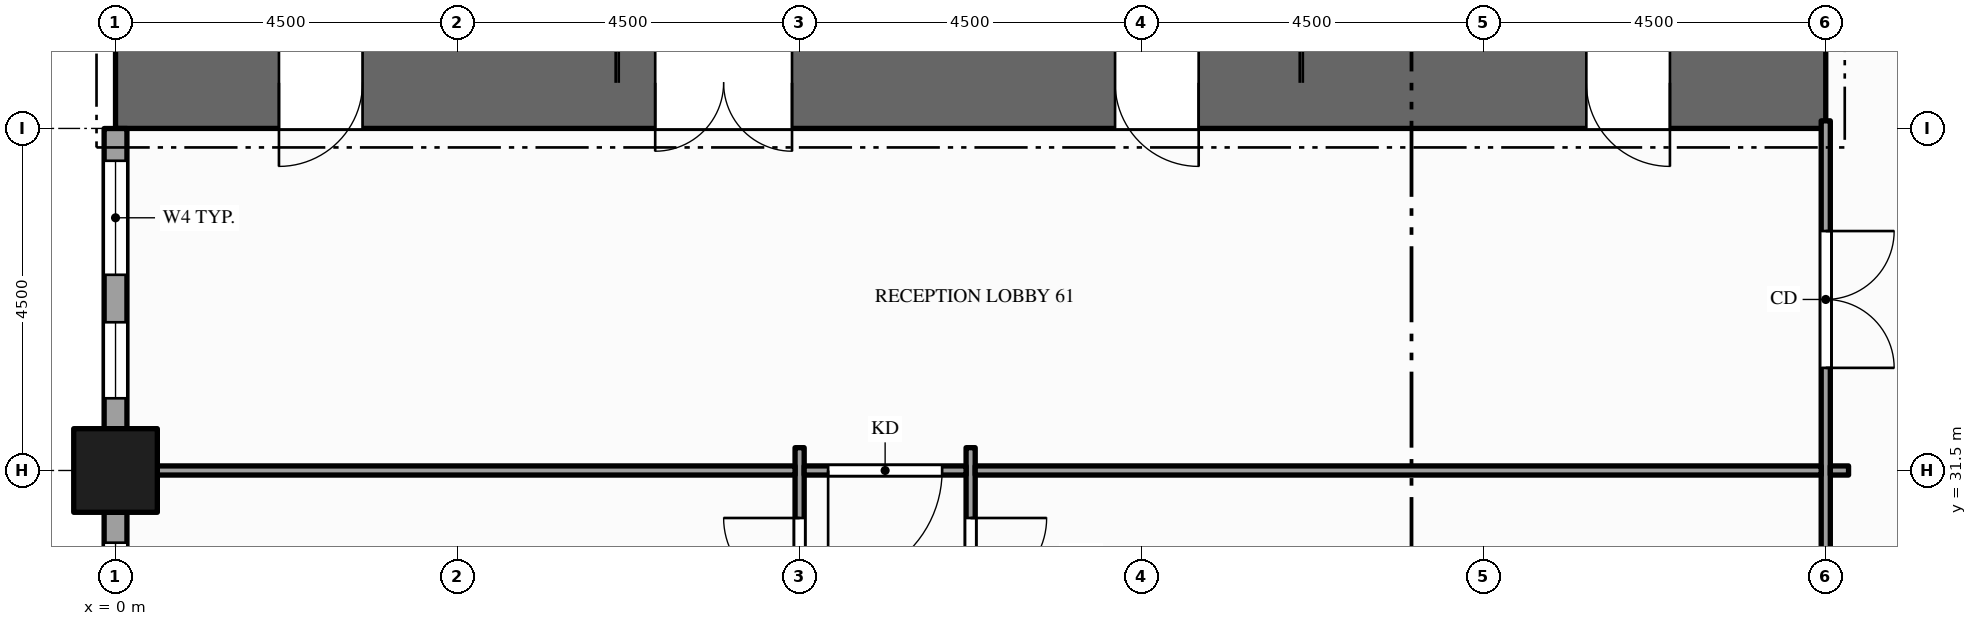
"""IFC4 building model, lengths in metres.
Left out: names, types, materials, properties, quantities, classifications, styles, units other than length and angle.
Written with IfcOpenShell. Run it as: python <this file> out.ifc"""

import sys

from ifc_helpers import new_model, si_unit, direction, frame, frame_2d, origin, origin_2d, place, context, subcontext, project, spatial, rectangle, hollow_rectangle, extrude, element, fill, save


model = new_model("IFC4")
c1 = context("Model", 3, precision=1e-05, world=origin(), true_north=direction((0.0, 1.0)))
c2 = subcontext(c1, "Body", "Model", "MODEL_VIEW")
j1 = project(units=[si_unit("LENGTHUNIT", "METRE"), si_unit("PLANEANGLEUNIT", "RADIAN")], contexts=[c1])
p1 = place(None, origin())
s1 = spatial("IfcSite", under=j1, at=p1, CompositionType="ELEMENT")
p2 = place(p1, origin())
s2 = spatial("IfcBuilding", under=s1, at=p2, CompositionType="ELEMENT")
p3 = place(p2, frame((0.0, 0.0, 14.0)))
s3 = spatial("IfcBuildingStorey", under=s2, at=p3, CompositionType="ELEMENT", Elevation=14.0)
p4 = place(p3, frame((0.0, 36.6, -0.15), z_axis=(0.0, 0.0, 1.0), x_axis=(1.0, 0.0, 0.0)))
e1 = element("IfcWall", 1, at=p4, inside=s3, PredefinedType="SHEAR", context=c2, shape_type="SweptSolid", body=[
    extrude(rectangle(XDim=22.5, YDim=1.2, at=frame_2d((11.25, 0.0))), origin(), (0.0, 0.0, 1.0), 5.0),
])
p5 = place(p4, frame((7.1, 0.0, 0.15)))
e2 = element("IfcOpeningElement", 2, at=p5, cuts=e1, PredefinedType="OPENING", context=c2, shape_type="SweptSolid", body=[
    extrude(rectangle(XDim=1.8, YDim=2.1, at=frame_2d((0.9, 1.05))), frame((0.0, 0.61, 0.0), z_axis=(0.0, -1.0, 0.0), x_axis=(1.0, 0.0, 0.0)), (0.0, 0.0, 1.0), 1.22),
])
p6 = place(p4, frame((13.15, 0.0, 0.15)))
e3 = element("IfcOpeningElement", 3, at=p6, cuts=e1, PredefinedType="OPENING", context=c2, shape_type="SweptSolid", body=[
    extrude(rectangle(XDim=1.1, YDim=2.1, at=frame_2d((0.55, 1.05))), frame((0.0, 0.61, 0.0), z_axis=(0.0, -1.0, 0.0), x_axis=(1.0, 0.0, 0.0)), (0.0, 0.0, 1.0), 1.22),
])
p7 = place(p4, frame((2.15, 0.0, 0.15)))
e4 = element("IfcOpeningElement", 4, at=p7, cuts=e1, PredefinedType="OPENING", context=c2, shape_type="SweptSolid", body=[
    extrude(rectangle(XDim=1.1, YDim=2.1, at=frame_2d((0.55, 1.05))), frame((0.0, 0.61, 0.0), z_axis=(0.0, -1.0, 0.0), x_axis=(1.0, 0.0, 0.0)), (0.0, 0.0, 1.0), 1.22),
])
p8 = place(p4, frame((19.35, 0.0, 0.15)))
e5 = element("IfcOpeningElement", 5, at=p8, cuts=e1, PredefinedType="OPENING", context=c2, shape_type="SweptSolid", body=[
    extrude(rectangle(XDim=1.1, YDim=2.1, at=frame_2d((0.55, 1.05))), frame((0.0, 0.61, 0.0), z_axis=(0.0, -1.0, 0.0), x_axis=(1.0, 0.0, 0.0)), (0.0, 0.0, 1.0), 1.22),
])
p9 = place(p3, frame((0.0, 31.5, -0.25), z_axis=(0.0, 0.0, 1.0), x_axis=(1.0, 0.0, 0.0)))
e6 = element("IfcColumn", 6, at=p9, inside=s3, PredefinedType="COLUMN", context=c2, shape_type="SweptSolid", body=[
    extrude(hollow_rectangle(XDim=1.1, YDim=1.1, WallThickness=0.06, at=origin_2d()), origin(), (0.0, 0.0, 1.0), 5.0),
])
p10 = place(p3, frame((0.0, 35.999, 0.0), z_axis=(0.0, 0.0, 1.0), x_axis=(0.0, -1.0, 0.0)))
e7 = element("IfcWall", 7, at=p10, inside=s3, PredefinedType="STANDARD", context=c2, shape_type="SweptSolid", body=[
    extrude(rectangle(XDim=3.949, YDim=0.3, at=frame_2d((1.975, 0.0))), origin(), (0.0, 0.0, 1.0), 4.036),
])
p11 = place(p10, frame((0.425, 0.0, 0.9)))
e8 = element("IfcOpeningElement", 8, at=p11, cuts=e7, PredefinedType="OPENING", context=c2, shape_type="SweptSolid", body=[
    extrude(rectangle(XDim=1.5, YDim=2.75, at=frame_2d((0.75, 1.375))), frame((0.0, 0.16, 0.0), z_axis=(0.0, -1.0, 0.0), x_axis=(1.0, 0.0, 0.0)), (0.0, 0.0, 1.0), 0.32),
])
p12 = place(p10, frame((2.549, 0.0, 0.9)))
e9 = element("IfcOpeningElement", 9, at=p12, cuts=e7, PredefinedType="OPENING", context=c2, shape_type="SweptSolid", body=[
    extrude(rectangle(XDim=1.0, YDim=2.75, at=frame_2d((0.5, 1.375))), frame((0.0, 0.16, 0.0), z_axis=(0.0, -1.0, 0.0), x_axis=(1.0, 0.0, 0.0)), (0.0, 0.0, 1.0), 0.32),
])
p13 = place(p3, frame((0.0, 30.95, 0.0), z_axis=(0.0, 0.0, 1.0), x_axis=(0.0, -1.0, 0.0)))
e10 = element("IfcWall", 10, at=p13, inside=s3, PredefinedType="STANDARD", context=c2, shape_type="SweptSolid", body=[
    extrude(rectangle(XDim=3.4, YDim=0.3, at=frame_2d((1.7, 0.0))), origin(), (0.0, 0.0, 1.0), 4.036),
])
p14 = place(p13, frame((0.4, 0.0, 0.9)))
e11 = element("IfcOpeningElement", 11, at=p14, cuts=e10, PredefinedType="OPENING", context=c2, shape_type="SweptSolid", body=[
    extrude(rectangle(XDim=1.0, YDim=2.75, at=frame_2d((0.5, 1.375))), frame((0.0, 0.16, 0.0), z_axis=(0.0, -1.0, 0.0), x_axis=(1.0, 0.0, 0.0)), (0.0, 0.0, 1.0), 0.32),
])
p15 = place(p13, frame((2.0, 0.0, 0.9)))
e12 = element("IfcOpeningElement", 12, at=p15, cuts=e10, PredefinedType="OPENING", context=c2, shape_type="SweptSolid", body=[
    extrude(rectangle(XDim=1.0, YDim=2.75, at=frame_2d((0.5, 1.375))), frame((0.0, 0.16, 0.0), z_axis=(0.0, -1.0, 0.0), x_axis=(1.0, 0.0, 0.0)), (0.0, 0.0, 1.0), 0.32),
])
p16 = place(p3, frame((9.0, 10.95, 0.0), z_axis=(0.0, 0.0, 1.0), x_axis=(0.0, 1.0, 0.0)))
e13 = element("IfcWall", 13, at=p16, inside=s3, PredefinedType="PARTITIONING", context=c2, shape_type="SweptSolid", body=[
    extrude(rectangle(XDim=20.85, YDim=0.12, at=frame_2d((10.425, 0.0))), origin(), (0.0, 0.0, 1.0), 3.5),
])
p17 = place(p16, frame((12.175, 0.0, 0.0)))
e14 = element("IfcOpeningElement", 14, at=p17, cuts=e13, PredefinedType="OPENING", context=c2, shape_type="SweptSolid", body=[
    extrude(rectangle(XDim=1.0, YDim=2.1, at=frame_2d((0.5, 1.05))), frame((0.0, 0.07, 0.0), z_axis=(0.0, -1.0, 0.0), x_axis=(1.0, 0.0, 0.0)), (0.0, 0.0, 1.0), 0.14),
])
p18 = place(p16, frame((14.425, 0.0, 0.0)))
e15 = element("IfcOpeningElement", 15, at=p18, cuts=e13, PredefinedType="OPENING", context=c2, shape_type="SweptSolid", body=[
    extrude(rectangle(XDim=1.0, YDim=2.1, at=frame_2d((0.5, 1.05))), frame((0.0, 0.07, 0.0), z_axis=(0.0, -1.0, 0.0), x_axis=(1.0, 0.0, 0.0)), (0.0, 0.0, 1.0), 0.14),
])
p19 = place(p16, frame((16.675, 0.0, 0.0)))
e16 = element("IfcOpeningElement", 16, at=p19, cuts=e13, PredefinedType="OPENING", context=c2, shape_type="SweptSolid", body=[
    extrude(rectangle(XDim=1.0, YDim=2.1, at=frame_2d((0.5, 1.05))), frame((0.0, 0.07, 0.0), z_axis=(0.0, -1.0, 0.0), x_axis=(1.0, 0.0, 0.0)), (0.0, 0.0, 1.0), 0.14),
])
p20 = place(p16, frame((18.925, 0.0, 0.0)))
e17 = element("IfcOpeningElement", 17, at=p20, cuts=e13, PredefinedType="OPENING", context=c2, shape_type="SweptSolid", body=[
    extrude(rectangle(XDim=1.0, YDim=2.1, at=frame_2d((0.5, 1.05))), frame((0.0, 0.07, 0.0), z_axis=(0.0, -1.0, 0.0), x_axis=(1.0, 0.0, 0.0)), (0.0, 0.0, 1.0), 0.14),
])
p21 = place(p3, frame((11.25, 10.95, 0.0), z_axis=(0.0, 0.0, 1.0), x_axis=(0.0, 1.0, 0.0)))
e18 = element("IfcWall", 18, at=p21, inside=s3, PredefinedType="PARTITIONING", context=c2, shape_type="SweptSolid", body=[
    extrude(rectangle(XDim=20.85, YDim=0.12, at=frame_2d((10.425, 0.0))), origin(), (0.0, 0.0, 1.0), 3.5),
])
p22 = place(p21, frame((5.425, 0.0, 0.0)))
e19 = element("IfcOpeningElement", 19, at=p22, cuts=e18, PredefinedType="OPENING", context=c2, shape_type="SweptSolid", body=[
    extrude(rectangle(XDim=1.0, YDim=2.1, at=frame_2d((0.5, 1.05))), frame((0.0, 0.07, 0.0), z_axis=(0.0, -1.0, 0.0), x_axis=(1.0, 0.0, 0.0)), (0.0, 0.0, 1.0), 0.14),
])
p23 = place(p21, frame((14.425, 0.0, 0.0)))
e20 = element("IfcOpeningElement", 20, at=p23, cuts=e18, PredefinedType="OPENING", context=c2, shape_type="SweptSolid", body=[
    extrude(rectangle(XDim=1.0, YDim=2.1, at=frame_2d((0.5, 1.05))), frame((0.0, 0.07, 0.0), z_axis=(0.0, -1.0, 0.0), x_axis=(1.0, 0.0, 0.0)), (0.0, 0.0, 1.0), 0.14),
])
p24 = place(p21, frame((18.925, 0.0, 0.0)))
e21 = element("IfcOpeningElement", 21, at=p24, cuts=e18, PredefinedType="OPENING", context=c2, shape_type="SweptSolid", body=[
    extrude(rectangle(XDim=1.0, YDim=2.1, at=frame_2d((0.5, 1.05))), frame((0.0, 0.07, 0.0), z_axis=(0.0, -1.0, 0.0), x_axis=(1.0, 0.0, 0.0)), (0.0, 0.0, 1.0), 0.14),
])
p25 = place(p3, frame((22.5, 0.15, 0.0), z_axis=(0.0, 0.0, 1.0), x_axis=(0.0, 1.0, 0.0)))
e22 = element("IfcWall", 22, at=p25, inside=s3, PredefinedType="PARTITIONING", context=c2, shape_type="SweptSolid", body=[
    extrude(rectangle(XDim=35.95, YDim=0.12, at=frame_2d((17.975, 0.0))), origin(), (0.0, 0.0, 1.0), 3.759),
])
p26 = place(p25, frame((9.225, 0.0, 0.0)))
e23 = element("IfcOpeningElement", 23, at=p26, cuts=e22, PredefinedType="OPENING", context=c2, shape_type="SweptSolid", body=[
    extrude(rectangle(XDim=1.5, YDim=2.1, at=frame_2d((0.75, 1.05))), frame((0.0, 0.07, 0.0), z_axis=(0.0, -1.0, 0.0), x_axis=(1.0, 0.0, 0.0)), (0.0, 0.0, 1.0), 0.14),
])
p27 = place(p25, frame((32.7, 0.0, 0.0)))
e24 = element("IfcOpeningElement", 24, at=p27, cuts=e22, PredefinedType="OPENING", context=c2, shape_type="SweptSolid", body=[
    extrude(rectangle(XDim=1.8, YDim=2.1, at=frame_2d((0.9, 1.05))), frame((0.0, 0.07, 0.0), z_axis=(0.0, -1.0, 0.0), x_axis=(1.0, 0.0, 0.0)), (0.0, 0.0, 1.0), 0.14),
])
p28 = place(p3, frame((0.15, 31.5, 0.0), z_axis=(0.0, 0.0, 1.0), x_axis=(1.0, 0.0, 0.0)))
e25 = element("IfcWall", 25, at=p28, inside=s3, PredefinedType="PARTITIONING", context=c2, shape_type="SweptSolid", body=[
    extrude(rectangle(XDim=8.79, YDim=0.12, at=frame_2d((4.395, 0.0))), origin(), (0.0, 0.0, 1.0), 3.759),
])
p29 = place(p3, frame((9.06, 31.5, 0.0), z_axis=(0.0, 0.0, 1.0), x_axis=(1.0, 0.0, 0.0)))
e26 = element("IfcWall", 26, at=p29, inside=s3, PredefinedType="PARTITIONING", context=c2, shape_type="SweptSolid", body=[
    extrude(rectangle(XDim=2.13, YDim=0.12, at=frame_2d((1.065, 0.0))), origin(), (0.0, 0.0, 1.0), 3.759),
])
p30 = place(p29, frame((0.315, 0.0, 0.0)))
e27 = element("IfcOpeningElement", 27, at=p30, cuts=e26, PredefinedType="OPENING", context=c2, shape_type="SweptSolid", body=[
    extrude(rectangle(XDim=1.5, YDim=2.1, at=frame_2d((0.75, 1.05))), frame((0.0, 0.07, 0.0), z_axis=(0.0, -1.0, 0.0), x_axis=(1.0, 0.0, 0.0)), (0.0, 0.0, 1.0), 0.14),
])
p31 = place(p3, frame((11.31, 31.5, 0.0), z_axis=(0.0, 0.0, 1.0), x_axis=(1.0, 0.0, 0.0)))
e28 = element("IfcWall", 28, at=p31, inside=s3, PredefinedType="PARTITIONING", context=c2, shape_type="SweptSolid", body=[
    extrude(rectangle(XDim=11.13, YDim=0.12, at=frame_2d((5.565, 0.0))), origin(), (0.0, 0.0, 1.0), 3.5),
])
p32 = place(p3, frame((22.56, 31.5, 0.0), z_axis=(0.0, 0.0, 1.0), x_axis=(1.0, 0.0, 0.0)))
e29 = element("IfcWall", 29, at=p32, inside=s3, PredefinedType="PARTITIONING", context=c2, shape_type="SweptSolid", body=[
    extrude(rectangle(XDim=0.24, YDim=0.12, at=frame_2d((0.12, 0.0))), origin(), (0.0, 0.0, 1.0), 3.759),
])
p33 = place(p11, origin())
e30 = element("IfcWindow", 30, at=p33, inside=s3, PartitioningType="SINGLE_PANEL", PredefinedType="WINDOW", context=c2, shape_type="SweptSolid", body=[
    extrude(rectangle(XDim=1.5, YDim=2.75, at=frame_2d((0.75, 1.375))), frame((0.0, 0.03, 0.0), z_axis=(0.0, -1.0, 0.0), x_axis=(1.0, 0.0, 0.0)), (0.0, 0.0, 1.0), 0.06),
])
fill(e8, e30)
p34 = place(p12, origin())
e31 = element("IfcWindow", 31, at=p34, inside=s3, PartitioningType="SINGLE_PANEL", PredefinedType="WINDOW", context=c2, shape_type="SweptSolid", body=[
    extrude(rectangle(XDim=1.0, YDim=2.75, at=frame_2d((0.5, 1.375))), frame((0.0, 0.03, 0.0), z_axis=(0.0, -1.0, 0.0), x_axis=(1.0, 0.0, 0.0)), (0.0, 0.0, 1.0), 0.06),
])
fill(e9, e31)
p35 = place(p14, origin())
e32 = element("IfcWindow", 32, at=p35, inside=s3, PartitioningType="SINGLE_PANEL", PredefinedType="WINDOW", context=c2, shape_type="SweptSolid", body=[
    extrude(rectangle(XDim=1.0, YDim=2.75, at=frame_2d((0.5, 1.375))), frame((0.0, 0.03, 0.0), z_axis=(0.0, -1.0, 0.0), x_axis=(1.0, 0.0, 0.0)), (0.0, 0.0, 1.0), 0.06),
])
fill(e11, e32)
p36 = place(p5, origin())
e33 = element("IfcDoor", 33, at=p36, inside=s3, OperationType="DOUBLE_DOOR_SINGLE_SWING", PredefinedType="DOOR", context=c2, shape_type="SweptSolid", body=[
    extrude(rectangle(XDim=1.8, YDim=2.1, at=frame_2d((0.9, 1.05))), frame((0.0, 0.025, 0.0), z_axis=(0.0, -1.0, 0.0), x_axis=(1.0, 0.0, 0.0)), (0.0, 0.0, 1.0), 0.05),
])
fill(e2, e33)
p37 = place(p6, origin())
e34 = element("IfcDoor", 34, at=p37, inside=s3, OperationType="SINGLE_SWING_RIGHT", PredefinedType="DOOR", context=c2, shape_type="SweptSolid", body=[
    extrude(rectangle(XDim=1.1, YDim=2.1, at=frame_2d((0.55, 1.05))), frame((0.0, 0.025, 0.0), z_axis=(0.0, -1.0, 0.0), x_axis=(1.0, 0.0, 0.0)), (0.0, 0.0, 1.0), 0.05),
])
fill(e3, e34)
p38 = place(p7, origin())
e35 = element("IfcDoor", 35, at=p38, inside=s3, OperationType="SINGLE_SWING_LEFT", PredefinedType="DOOR", context=c2, shape_type="SweptSolid", body=[
    extrude(rectangle(XDim=1.1, YDim=2.1, at=frame_2d((0.55, 1.05))), frame((0.0, 0.025, 0.0), z_axis=(0.0, -1.0, 0.0), x_axis=(1.0, 0.0, 0.0)), (0.0, 0.0, 1.0), 0.05),
])
fill(e4, e35)
p39 = place(p8, origin())
e36 = element("IfcDoor", 36, at=p39, inside=s3, OperationType="SINGLE_SWING_RIGHT", PredefinedType="DOOR", context=c2, shape_type="SweptSolid", body=[
    extrude(rectangle(XDim=1.1, YDim=2.1, at=frame_2d((0.55, 1.05))), frame((0.0, 0.025, 0.0), z_axis=(0.0, -1.0, 0.0), x_axis=(1.0, 0.0, 0.0)), (0.0, 0.0, 1.0), 0.05),
])
fill(e5, e36)
p40 = place(p30, origin())
e37 = element("IfcDoor", 37, at=p40, inside=s3, OperationType="SINGLE_SWING_LEFT", PredefinedType="DOOR", context=c2, shape_type="SweptSolid", body=[
    extrude(rectangle(XDim=1.5, YDim=2.1, at=frame_2d((0.75, 1.05))), frame((0.0, 0.025, 0.0), z_axis=(0.0, -1.0, 0.0), x_axis=(1.0, 0.0, 0.0)), (0.0, 0.0, 1.0), 0.05),
])
fill(e27, e37)
p41 = place(p20, origin())
e38 = element("IfcDoor", 38, at=p41, inside=s3, OperationType="SINGLE_SWING_RIGHT", PredefinedType="DOOR", context=c2, shape_type="SweptSolid", body=[
    extrude(rectangle(XDim=1.0, YDim=2.1, at=frame_2d((0.5, 1.05))), frame((0.0, 0.025, 0.0), z_axis=(0.0, -1.0, 0.0), x_axis=(1.0, 0.0, 0.0)), (0.0, 0.0, 1.0), 0.05),
])
fill(e17, e38)
p42 = place(p24, origin())
e39 = element("IfcDoor", 39, at=p42, inside=s3, OperationType="SINGLE_SWING_RIGHT", PredefinedType="DOOR", context=c2, shape_type="SweptSolid", body=[
    extrude(rectangle(XDim=1.0, YDim=2.1, at=frame_2d((0.5, 1.05))), frame((0.0, 0.025, 0.0), z_axis=(0.0, -1.0, 0.0), x_axis=(1.0, 0.0, 0.0)), (0.0, 0.0, 1.0), 0.05),
])
fill(e21, e39)
p43 = place(p27, origin())
e40 = element("IfcDoor", 40, at=p43, inside=s3, OperationType="DOUBLE_DOOR_SINGLE_SWING", PredefinedType="DOOR", context=c2, shape_type="SweptSolid", body=[
    extrude(rectangle(XDim=1.8, YDim=2.1, at=frame_2d((0.9, 1.05))), frame((0.0, 0.025, 0.0), z_axis=(0.0, -1.0, 0.0), x_axis=(1.0, 0.0, 0.0)), (0.0, 0.0, 1.0), 0.05),
])
fill(e24, e40)
save(model, sys.argv[1])
